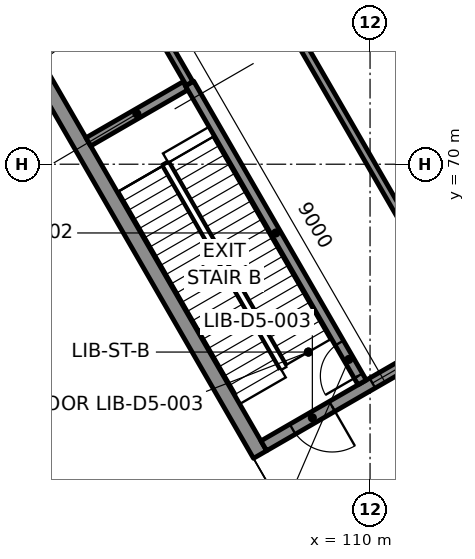
"""IFC4 building model, lengths in metres.
Left out: names, types, materials, properties, quantities, classifications, styles, units other than length and angle.
Written with IfcOpenShell. Run it as: python <this file> out.ifc"""

import sys

from ifc_helpers import new_model, si_unit, direction, frame, frame_2d, origin, origin_2d, place, context, subcontext, project, spatial, rectangle, extrude, element, fill, save


model = new_model("IFC4")
c1 = context("Model", 3, precision=1e-05, world=origin(), true_north=direction((0.0, 1.0)))
c2 = subcontext(c1, "Body", "Model", "MODEL_VIEW")
j1 = project(units=[si_unit("LENGTHUNIT", "METRE"), si_unit("PLANEANGLEUNIT", "RADIAN")], contexts=[c1])
p1 = place(None, origin())
s1 = spatial("IfcSite", under=j1, at=p1, CompositionType="ELEMENT")
p2 = place(p1, origin())
s2 = spatial("IfcBuilding", under=s1, at=p2, CompositionType="ELEMENT")
p3 = place(p2, origin())
s3 = spatial("IfcBuildingStorey", under=s2, at=p3, CompositionType="ELEMENT", Elevation=0.0)
p4 = place(p3, frame((101.821, 68.315, 0.0), z_axis=(0.0, 0.0, 1.0), x_axis=(-0.5, 0.866025403784, 0.0)))
e1 = element("IfcColumn", 1, at=p4, inside=s3, PredefinedType="COLUMN", context=c2, shape_type="SweptSolid", body=[
    extrude(rectangle(XDim=1.2, YDim=1.5, at=origin_2d()), origin(), (0.0, 0.0, 1.0), 8.0),
])
p5 = place(p3, frame((101.471, 67.42, 0.0), z_axis=(0.0, 0.0, 1.0), x_axis=(0.866026058841, 0.499998865407, 0.0)))
e2 = element("IfcWall", 2, at=p5, inside=s3, PredefinedType="PARTITIONING", context=c2, shape_type="SweptSolid", body=[
    extrude(rectangle(XDim=1.708, YDim=0.1, at=frame_2d((0.854, 0.0))), origin(), (0.0, 0.0, 1.0), 7.1),
])
p6 = place(p3, frame((91.575, 66.47, 0.0), z_axis=(0.0, 0.0, 1.0), x_axis=(0.866027754727, -0.499995928025, 0.0)))
e3 = element("IfcWall", 3, at=p6, inside=s3, PredefinedType="PARTITIONING", context=c2, shape_type="SweptSolid", body=[
    extrude(rectangle(XDim=13.214, YDim=0.15, at=frame_2d((6.607, 0.0))), origin(), (0.0, 0.0, 1.0), 7.1),
])
p7 = place(p6, frame((8.091, 0.0, 0.0)))
e4 = element("IfcOpeningElement", 4, at=p7, cuts=e3, PredefinedType="OPENING", context=c2, shape_type="SweptSolid", body=[
    extrude(rectangle(XDim=0.9, YDim=2.1, at=frame_2d((0.45, 1.05))), frame((0.0, 0.085, 0.0), z_axis=(0.0, -1.0, 0.0), x_axis=(1.0, 0.0, 0.0)), (0.0, 0.0, 1.0), 0.17),
])
p8 = place(p3, frame((107.504, 60.451, 0.0), z_axis=(0.0, 0.0, 1.0), x_axis=(-0.500000550228, 0.86602508611, 0.0)))
e5 = element("IfcWall", 5, at=p8, inside=s3, PredefinedType="SOLIDWALL", context=c2, shape_type="SweptSolid", body=[
    extrude(rectangle(XDim=57.704, YDim=0.3, at=frame_2d((28.852, 0.0))), origin(), (0.0, 0.0, 1.0), 7.7),
])
p9 = place(p8, frame((56.104, 0.0, 0.0)))
e6 = element("IfcOpeningElement", 6, at=p9, cuts=e5, PredefinedType="OPENING", context=c2, shape_type="SweptSolid", body=[
    extrude(rectangle(XDim=1.2, YDim=2.4, at=frame_2d((0.6, 1.2))), frame((0.0, 0.16, 0.0), z_axis=(0.0, -1.0, 0.0), x_axis=(1.0, 0.0, 0.0)), (0.0, 0.0, 1.0), 0.32),
])
p10 = place(p8, frame((1.552, 0.0, 0.15)))
e7 = element("IfcOpeningElement", 7, at=p10, cuts=e5, PredefinedType="OPENING", context=c2, shape_type="SweptSolid", body=[
    extrude(rectangle(XDim=2.1, YDim=5.4, at=frame_2d((1.05, 2.7))), frame((0.0, 0.16, 0.0), z_axis=(0.0, -1.0, 0.0), x_axis=(1.0, 0.0, 0.0)), (0.0, 0.0, 1.0), 0.32),
])
p11 = place(p8, frame((4.052, 0.0, 0.15)))
e8 = element("IfcOpeningElement", 8, at=p11, cuts=e5, PredefinedType="OPENING", context=c2, shape_type="SweptSolid", body=[
    extrude(rectangle(XDim=2.1, YDim=5.4, at=frame_2d((1.05, 2.7))), frame((0.0, 0.16, 0.0), z_axis=(0.0, -1.0, 0.0), x_axis=(1.0, 0.0, 0.0)), (0.0, 0.0, 1.0), 0.32),
])
p12 = place(p8, frame((6.552, 0.0, 0.15)))
e9 = element("IfcOpeningElement", 9, at=p12, cuts=e5, PredefinedType="OPENING", context=c2, shape_type="SweptSolid", body=[
    extrude(rectangle(XDim=2.1, YDim=5.4, at=frame_2d((1.05, 2.7))), frame((0.0, 0.16, 0.0), z_axis=(0.0, -1.0, 0.0), x_axis=(1.0, 0.0, 0.0)), (0.0, 0.0, 1.0), 0.32),
])
p13 = place(p8, frame((9.052, 0.0, 0.15)))
e10 = element("IfcOpeningElement", 10, at=p13, cuts=e5, PredefinedType="OPENING", context=c2, shape_type="SweptSolid", body=[
    extrude(rectangle(XDim=2.1, YDim=5.4, at=frame_2d((1.05, 2.7))), frame((0.0, 0.16, 0.0), z_axis=(0.0, -1.0, 0.0), x_axis=(1.0, 0.0, 0.0)), (0.0, 0.0, 1.0), 0.32),
])
p14 = place(p8, frame((11.552, 0.0, 0.15)))
e11 = element("IfcOpeningElement", 11, at=p14, cuts=e5, PredefinedType="OPENING", context=c2, shape_type="SweptSolid", body=[
    extrude(rectangle(XDim=2.1, YDim=5.4, at=frame_2d((1.05, 2.7))), frame((0.0, 0.16, 0.0), z_axis=(0.0, -1.0, 0.0), x_axis=(1.0, 0.0, 0.0)), (0.0, 0.0, 1.0), 0.32),
])
p15 = place(p8, frame((14.052, 0.0, 0.15)))
e12 = element("IfcOpeningElement", 12, at=p15, cuts=e5, PredefinedType="OPENING", context=c2, shape_type="SweptSolid", body=[
    extrude(rectangle(XDim=2.1, YDim=5.4, at=frame_2d((1.05, 2.7))), frame((0.0, 0.16, 0.0), z_axis=(0.0, -1.0, 0.0), x_axis=(1.0, 0.0, 0.0)), (0.0, 0.0, 1.0), 0.32),
])
p16 = place(p8, frame((16.552, 0.0, 0.15)))
e13 = element("IfcOpeningElement", 13, at=p16, cuts=e5, PredefinedType="OPENING", context=c2, shape_type="SweptSolid", body=[
    extrude(rectangle(XDim=2.1, YDim=5.4, at=frame_2d((1.05, 2.7))), frame((0.0, 0.16, 0.0), z_axis=(0.0, -1.0, 0.0), x_axis=(1.0, 0.0, 0.0)), (0.0, 0.0, 1.0), 0.32),
])
p17 = place(p8, frame((19.052, 0.0, 0.15)))
e14 = element("IfcOpeningElement", 14, at=p17, cuts=e5, PredefinedType="OPENING", context=c2, shape_type="SweptSolid", body=[
    extrude(rectangle(XDim=2.1, YDim=5.4, at=frame_2d((1.05, 2.7))), frame((0.0, 0.16, 0.0), z_axis=(0.0, -1.0, 0.0), x_axis=(1.0, 0.0, 0.0)), (0.0, 0.0, 1.0), 0.32),
])
p18 = place(p8, frame((21.552, 0.0, 0.15)))
e15 = element("IfcOpeningElement", 15, at=p18, cuts=e5, PredefinedType="OPENING", context=c2, shape_type="SweptSolid", body=[
    extrude(rectangle(XDim=2.1, YDim=5.4, at=frame_2d((1.05, 2.7))), frame((0.0, 0.16, 0.0), z_axis=(0.0, -1.0, 0.0), x_axis=(1.0, 0.0, 0.0)), (0.0, 0.0, 1.0), 0.32),
])
p19 = place(p8, frame((24.052, 0.0, 0.15)))
e16 = element("IfcOpeningElement", 16, at=p19, cuts=e5, PredefinedType="OPENING", context=c2, shape_type="SweptSolid", body=[
    extrude(rectangle(XDim=2.1, YDim=5.4, at=frame_2d((1.05, 2.7))), frame((0.0, 0.16, 0.0), z_axis=(0.0, -1.0, 0.0), x_axis=(1.0, 0.0, 0.0)), (0.0, 0.0, 1.0), 0.32),
])
p20 = place(p8, frame((26.552, 0.0, 0.15)))
e17 = element("IfcOpeningElement", 17, at=p20, cuts=e5, PredefinedType="OPENING", context=c2, shape_type="SweptSolid", body=[
    extrude(rectangle(XDim=2.1, YDim=5.4, at=frame_2d((1.05, 2.7))), frame((0.0, 0.16, 0.0), z_axis=(0.0, -1.0, 0.0), x_axis=(1.0, 0.0, 0.0)), (0.0, 0.0, 1.0), 0.32),
])
p21 = place(p8, frame((29.052, 0.0, 0.15)))
e18 = element("IfcOpeningElement", 18, at=p21, cuts=e5, PredefinedType="OPENING", context=c2, shape_type="SweptSolid", body=[
    extrude(rectangle(XDim=2.1, YDim=5.4, at=frame_2d((1.05, 2.7))), frame((0.0, 0.16, 0.0), z_axis=(0.0, -1.0, 0.0), x_axis=(1.0, 0.0, 0.0)), (0.0, 0.0, 1.0), 0.32),
])
p22 = place(p8, frame((31.552, 0.0, 0.15)))
e19 = element("IfcOpeningElement", 19, at=p22, cuts=e5, PredefinedType="OPENING", context=c2, shape_type="SweptSolid", body=[
    extrude(rectangle(XDim=2.1, YDim=5.4, at=frame_2d((1.05, 2.7))), frame((0.0, 0.16, 0.0), z_axis=(0.0, -1.0, 0.0), x_axis=(1.0, 0.0, 0.0)), (0.0, 0.0, 1.0), 0.32),
])
p23 = place(p8, frame((34.052, 0.0, 0.15)))
e20 = element("IfcOpeningElement", 20, at=p23, cuts=e5, PredefinedType="OPENING", context=c2, shape_type="SweptSolid", body=[
    extrude(rectangle(XDim=2.1, YDim=5.4, at=frame_2d((1.05, 2.7))), frame((0.0, 0.16, 0.0), z_axis=(0.0, -1.0, 0.0), x_axis=(1.0, 0.0, 0.0)), (0.0, 0.0, 1.0), 0.32),
])
p24 = place(p8, frame((36.552, 0.0, 0.15)))
e21 = element("IfcOpeningElement", 21, at=p24, cuts=e5, PredefinedType="OPENING", context=c2, shape_type="SweptSolid", body=[
    extrude(rectangle(XDim=2.1, YDim=5.4, at=frame_2d((1.05, 2.7))), frame((0.0, 0.16, 0.0), z_axis=(0.0, -1.0, 0.0), x_axis=(1.0, 0.0, 0.0)), (0.0, 0.0, 1.0), 0.32),
])
p25 = place(p8, frame((39.052, 0.0, 0.15)))
e22 = element("IfcOpeningElement", 22, at=p25, cuts=e5, PredefinedType="OPENING", context=c2, shape_type="SweptSolid", body=[
    extrude(rectangle(XDim=2.1, YDim=5.4, at=frame_2d((1.05, 2.7))), frame((0.0, 0.16, 0.0), z_axis=(0.0, -1.0, 0.0), x_axis=(1.0, 0.0, 0.0)), (0.0, 0.0, 1.0), 0.32),
])
p26 = place(p8, frame((41.552, 0.0, 0.15)))
e23 = element("IfcOpeningElement", 23, at=p26, cuts=e5, PredefinedType="OPENING", context=c2, shape_type="SweptSolid", body=[
    extrude(rectangle(XDim=2.1, YDim=5.4, at=frame_2d((1.05, 2.7))), frame((0.0, 0.16, 0.0), z_axis=(0.0, -1.0, 0.0), x_axis=(1.0, 0.0, 0.0)), (0.0, 0.0, 1.0), 0.32),
])
p27 = place(p8, frame((44.052, 0.0, 0.15)))
e24 = element("IfcOpeningElement", 24, at=p27, cuts=e5, PredefinedType="OPENING", context=c2, shape_type="SweptSolid", body=[
    extrude(rectangle(XDim=2.1, YDim=5.4, at=frame_2d((1.05, 2.7))), frame((0.0, 0.16, 0.0), z_axis=(0.0, -1.0, 0.0), x_axis=(1.0, 0.0, 0.0)), (0.0, 0.0, 1.0), 0.32),
])
p28 = place(p8, frame((46.552, 0.0, 0.15)))
e25 = element("IfcOpeningElement", 25, at=p28, cuts=e5, PredefinedType="OPENING", context=c2, shape_type="SweptSolid", body=[
    extrude(rectangle(XDim=2.1, YDim=5.4, at=frame_2d((1.05, 2.7))), frame((0.0, 0.16, 0.0), z_axis=(0.0, -1.0, 0.0), x_axis=(1.0, 0.0, 0.0)), (0.0, 0.0, 1.0), 0.32),
])
p29 = place(p8, frame((49.052, 0.0, 0.15)))
e26 = element("IfcOpeningElement", 26, at=p29, cuts=e5, PredefinedType="OPENING", context=c2, shape_type="SweptSolid", body=[
    extrude(rectangle(XDim=2.1, YDim=5.4, at=frame_2d((1.05, 2.7))), frame((0.0, 0.16, 0.0), z_axis=(0.0, -1.0, 0.0), x_axis=(1.0, 0.0, 0.0)), (0.0, 0.0, 1.0), 0.32),
])
p30 = place(p8, frame((51.552, 0.0, 0.15)))
e27 = element("IfcOpeningElement", 27, at=p30, cuts=e5, PredefinedType="OPENING", context=c2, shape_type="SweptSolid", body=[
    extrude(rectangle(XDim=2.1, YDim=5.4, at=frame_2d((1.05, 2.7))), frame((0.0, 0.16, 0.0), z_axis=(0.0, -1.0, 0.0), x_axis=(1.0, 0.0, 0.0)), (0.0, 0.0, 1.0), 0.32),
])
p31 = place(p3, frame((107.106, 62.36, 0.0), z_axis=(0.0, 0.0, 1.0), x_axis=(-0.49999992739, 0.866025445706, 0.0)))
e28 = element("IfcWall", 28, at=p31, inside=s3, PredefinedType="SOLIDWALL", context=c2, shape_type="SweptSolid", body=[
    extrude(rectangle(XDim=54.0, YDim=0.4, at=frame_2d((27.0, 0.0))), origin(), (0.0, 0.0, 1.0), 7.64),
])
p32 = place(p3, frame((132.579, 77.24, 0.0), z_axis=(0.0, 0.0, 1.0), x_axis=(-0.866028651824, -0.499994374189, 0.0)))
e29 = element("IfcWall", 29, at=p32, inside=s3, PredefinedType="SOLIDWALL", context=c2, shape_type="SweptSolid", body=[
    extrude(rectangle(XDim=29.3, YDim=0.3, at=frame_2d((14.65, 0.0))), origin(), (0.0, 0.0, 1.0), 7.64),
])
p33 = place(p32, frame((15.7, 0.0, 0.0)))
e30 = element("IfcOpeningElement", 30, at=p33, cuts=e29, PredefinedType="OPENING", context=c2, shape_type="SweptSolid", body=[
    extrude(rectangle(XDim=2.0, YDim=2.4, at=frame_2d((1.0, 1.2))), frame((0.0, 0.16, 0.0), z_axis=(0.0, -1.0, 0.0), x_axis=(1.0, 0.0, 0.0)), (0.0, 0.0, 1.0), 0.32),
])
p34 = place(p32, frame((11.7, 0.0, 0.0)))
e31 = element("IfcOpeningElement", 31, at=p34, cuts=e29, PredefinedType="OPENING", context=c2, shape_type="SweptSolid", body=[
    extrude(rectangle(XDim=2.0, YDim=2.4, at=frame_2d((1.0, 1.2))), frame((0.0, 0.16, 0.0), z_axis=(0.0, -1.0, 0.0), x_axis=(1.0, 0.0, 0.0)), (0.0, 0.0, 1.0), 0.32),
])
p35 = place(p32, frame((27.225, 0.0, 0.0)))
e32 = element("IfcOpeningElement", 32, at=p35, cuts=e29, PredefinedType="OPENING", context=c2, shape_type="SweptSolid", body=[
    extrude(rectangle(XDim=1.2, YDim=2.2, at=frame_2d((0.6, 1.1))), frame((0.0, 0.16, 0.0), z_axis=(0.0, -1.0, 0.0), x_axis=(1.0, 0.0, 0.0)), (0.0, 0.0, 1.0), 0.32),
])
p36 = place(p32, frame((23.6, 0.0, 0.6)))
e33 = element("IfcOpeningElement", 33, at=p36, cuts=e29, PredefinedType="OPENING", context=c2, shape_type="SweptSolid", body=[
    extrude(rectangle(XDim=2.4, YDim=3.6, at=frame_2d((1.2, 1.8))), frame((0.0, 0.16, 0.0), z_axis=(0.0, -1.0, 0.0), x_axis=(1.0, 0.0, 0.0)), (0.0, 0.0, 1.0), 0.32),
])
p37 = place(p32, frame((3.5, 0.0, 0.6)))
e34 = element("IfcOpeningElement", 34, at=p37, cuts=e29, PredefinedType="OPENING", context=c2, shape_type="SweptSolid", body=[
    extrude(rectangle(XDim=2.4, YDim=3.6, at=frame_2d((1.2, 1.8))), frame((0.0, 0.16, 0.0), z_axis=(0.0, -1.0, 0.0), x_axis=(1.0, 0.0, 0.0)), (0.0, 0.0, 1.0), 0.32),
])
p38 = place(p3, frame((102.587, 70.587, 0.0), z_axis=(0.0, 0.0, 1.0), x_axis=(0.866039495442, 0.49997559174, 0.0)))
e35 = element("IfcWall", 35, at=p38, inside=s3, PredefinedType="SOLIDWALL", context=c2, shape_type="SweptSolid", body=[
    extrude(rectangle(XDim=2.95, YDim=0.25, at=frame_2d((1.475, 0.0))), origin(), (0.0, 0.0, 1.0), 7.64),
])
p39 = place(p3, frame((109.792, 64.257, 0.0), z_axis=(0.0, 0.0, 1.0), x_axis=(-0.499994616197, 0.866028512102, 0.0)))
e36 = element("IfcWall", 36, at=p39, inside=s3, PredefinedType="SOLIDWALL", context=c2, shape_type="SweptSolid", body=[
    extrude(rectangle(XDim=9.085, YDim=0.25, at=frame_2d((4.542, 0.0))), origin(), (0.0, 0.0, 1.0), 7.64),
])
p40 = place(p39, frame((0.2, 0.0, 0.0)))
e37 = element("IfcOpeningElement", 37, at=p40, cuts=e36, PredefinedType="OPENING", context=c2, shape_type="SweptSolid", body=[
    extrude(rectangle(XDim=1.0, YDim=2.1, at=frame_2d((0.5, 1.05))), frame((0.0, 0.135, 0.0), z_axis=(0.0, -1.0, 0.0), x_axis=(1.0, 0.0, 0.0)), (0.0, 0.0, 1.0), 0.27),
])
p41 = place(p3, frame((105.25, 72.125, 0.0), z_axis=(0.0, 0.0, 1.0), x_axis=(-0.499996309931, 0.866027534236, 0.0)))
e38 = element("IfcWall", 38, at=p41, inside=s3, PredefinedType="PARTITIONING", context=c2, shape_type="SweptSolid", body=[
    extrude(rectangle(XDim=12.09, YDim=0.2, at=frame_2d((6.045, 0.0))), origin(), (0.0, 0.0, 1.0), 7.64),
])
p42 = place(p41, frame((2.365, 0.0, 0.0)))
e39 = element("IfcOpeningElement", 39, at=p42, cuts=e38, PredefinedType="OPENING", context=c2, shape_type="SweptSolid", body=[
    extrude(rectangle(XDim=0.9, YDim=2.1, at=frame_2d((0.45, 1.05))), frame((0.0, 0.11, 0.0), z_axis=(0.0, -1.0, 0.0), x_axis=(1.0, 0.0, 0.0)), (0.0, 0.0, 1.0), 0.22),
])
p43 = place(p41, frame((8.365, 0.0, 0.0)))
e40 = element("IfcOpeningElement", 40, at=p43, cuts=e38, PredefinedType="OPENING", context=c2, shape_type="SweptSolid", body=[
    extrude(rectangle(XDim=0.9, YDim=2.1, at=frame_2d((0.45, 1.05))), frame((0.0, 0.11, 0.0), z_axis=(0.0, -1.0, 0.0), x_axis=(1.0, 0.0, 0.0)), (0.0, 0.0, 1.0), 0.22),
])
p44 = place(p3, frame((112.456, 65.794, 0.0), z_axis=(0.0, 0.0, 1.0), x_axis=(-0.499998559706, 0.866026235337, 0.0)))
e41 = element("IfcWall", 41, at=p44, inside=s3, PredefinedType="PARTITIONING", context=c2, shape_type="SweptSolid", body=[
    extrude(rectangle(XDim=53.4, YDim=0.2, at=frame_2d((26.7, 0.0))), origin(), (0.0, 0.0, 1.0), 7.64),
])
p45 = place(p44, frame((12.6, 0.0, 0.0)))
e42 = element("IfcOpeningElement", 42, at=p45, cuts=e41, PredefinedType="OPENING", context=c2, shape_type="SweptSolid", body=[
    extrude(rectangle(XDim=1.8, YDim=2.1, at=frame_2d((0.9, 1.05))), frame((0.0, 0.11, 0.0), z_axis=(0.0, -1.0, 0.0), x_axis=(1.0, 0.0, 0.0)), (0.0, 0.0, 1.0), 0.22),
])
p46 = place(p44, frame((25.8, 0.0, 0.0)))
e43 = element("IfcOpeningElement", 43, at=p46, cuts=e41, PredefinedType="OPENING", context=c2, shape_type="SweptSolid", body=[
    extrude(rectangle(XDim=1.8, YDim=2.1, at=frame_2d((0.9, 1.05))), frame((0.0, 0.11, 0.0), z_axis=(0.0, -1.0, 0.0), x_axis=(1.0, 0.0, 0.0)), (0.0, 0.0, 1.0), 0.22),
])
p47 = place(p44, frame((35.0, 0.0, 0.0)))
e44 = element("IfcOpeningElement", 44, at=p47, cuts=e41, PredefinedType="OPENING", context=c2, shape_type="SweptSolid", body=[
    extrude(rectangle(XDim=1.0, YDim=2.1, at=frame_2d((0.5, 1.05))), frame((0.0, 0.11, 0.0), z_axis=(0.0, -1.0, 0.0), x_axis=(1.0, 0.0, 0.0)), (0.0, 0.0, 1.0), 0.22),
])
p48 = place(p44, frame((45.75, 0.0, 0.0)))
e45 = element("IfcOpeningElement", 45, at=p48, cuts=e41, PredefinedType="OPENING", context=c2, shape_type="SweptSolid", body=[
    extrude(rectangle(XDim=1.8, YDim=2.1, at=frame_2d((0.9, 1.05))), frame((0.0, 0.11, 0.0), z_axis=(0.0, -1.0, 0.0), x_axis=(1.0, 0.0, 0.0)), (0.0, 0.0, 1.0), 0.22),
])
p49 = place(p10, origin())
e46 = element("IfcWindow", 46, at=p49, inside=s3, PartitioningType="SINGLE_PANEL", PredefinedType="WINDOW", context=c2, shape_type="SweptSolid", body=[
    extrude(rectangle(XDim=2.1, YDim=5.4, at=frame_2d((1.05, 2.7))), frame((0.0, 0.03, 0.0), z_axis=(0.0, -1.0, 0.0), x_axis=(1.0, 0.0, 0.0)), (0.0, 0.0, 1.0), 0.06),
])
fill(e7, e46)
p50 = place(p11, origin())
e47 = element("IfcWindow", 47, at=p50, inside=s3, PartitioningType="SINGLE_PANEL", PredefinedType="WINDOW", context=c2, shape_type="SweptSolid", body=[
    extrude(rectangle(XDim=2.1, YDim=5.4, at=frame_2d((1.05, 2.7))), frame((0.0, 0.03, 0.0), z_axis=(0.0, -1.0, 0.0), x_axis=(1.0, 0.0, 0.0)), (0.0, 0.0, 1.0), 0.06),
])
fill(e8, e47)
p51 = place(p12, origin())
e48 = element("IfcWindow", 48, at=p51, inside=s3, PartitioningType="SINGLE_PANEL", PredefinedType="WINDOW", context=c2, shape_type="SweptSolid", body=[
    extrude(rectangle(XDim=2.1, YDim=5.4, at=frame_2d((1.05, 2.7))), frame((0.0, 0.03, 0.0), z_axis=(0.0, -1.0, 0.0), x_axis=(1.0, 0.0, 0.0)), (0.0, 0.0, 1.0), 0.06),
])
fill(e9, e48)
p52 = place(p13, origin())
e49 = element("IfcWindow", 49, at=p52, inside=s3, PartitioningType="SINGLE_PANEL", PredefinedType="WINDOW", context=c2, shape_type="SweptSolid", body=[
    extrude(rectangle(XDim=2.1, YDim=5.4, at=frame_2d((1.05, 2.7))), frame((0.0, 0.03, 0.0), z_axis=(0.0, -1.0, 0.0), x_axis=(1.0, 0.0, 0.0)), (0.0, 0.0, 1.0), 0.06),
])
fill(e10, e49)
p53 = place(p14, origin())
e50 = element("IfcWindow", 50, at=p53, inside=s3, PartitioningType="SINGLE_PANEL", PredefinedType="WINDOW", context=c2, shape_type="SweptSolid", body=[
    extrude(rectangle(XDim=2.1, YDim=5.4, at=frame_2d((1.05, 2.7))), frame((0.0, 0.03, 0.0), z_axis=(0.0, -1.0, 0.0), x_axis=(1.0, 0.0, 0.0)), (0.0, 0.0, 1.0), 0.06),
])
fill(e11, e50)
p54 = place(p35, origin())
e51 = element("IfcDoor", 51, at=p54, inside=s3, OperationType="SINGLE_SWING_LEFT", PredefinedType="DOOR", context=c2, shape_type="SweptSolid", body=[
    extrude(rectangle(XDim=1.2, YDim=2.2, at=frame_2d((0.6, 1.1))), frame((0.0, 0.025, 0.0), z_axis=(0.0, -1.0, 0.0), x_axis=(1.0, 0.0, 0.0)), (0.0, 0.0, 1.0), 0.05),
])
fill(e32, e51)
p55 = place(p36, origin())
e52 = element("IfcWindow", 52, at=p55, inside=s3, PartitioningType="SINGLE_PANEL", PredefinedType="WINDOW", context=c2, shape_type="SweptSolid", body=[
    extrude(rectangle(XDim=2.4, YDim=3.6, at=frame_2d((1.2, 1.8))), frame((0.0, 0.03, 0.0), z_axis=(0.0, -1.0, 0.0), x_axis=(1.0, 0.0, 0.0)), (0.0, 0.0, 1.0), 0.06),
])
fill(e33, e52)
p56 = place(p40, origin())
e53 = element("IfcDoor", 53, at=p56, inside=s3, OperationType="SINGLE_SWING_LEFT", PredefinedType="DOOR", context=c2, shape_type="SweptSolid", body=[
    extrude(rectangle(XDim=1.0, YDim=2.1, at=frame_2d((0.5, 1.05))), frame((0.0, 0.025, 0.0), z_axis=(0.0, -1.0, 0.0), x_axis=(1.0, 0.0, 0.0)), (0.0, 0.0, 1.0), 0.05),
])
fill(e37, e53)
save(model, sys.argv[1])
